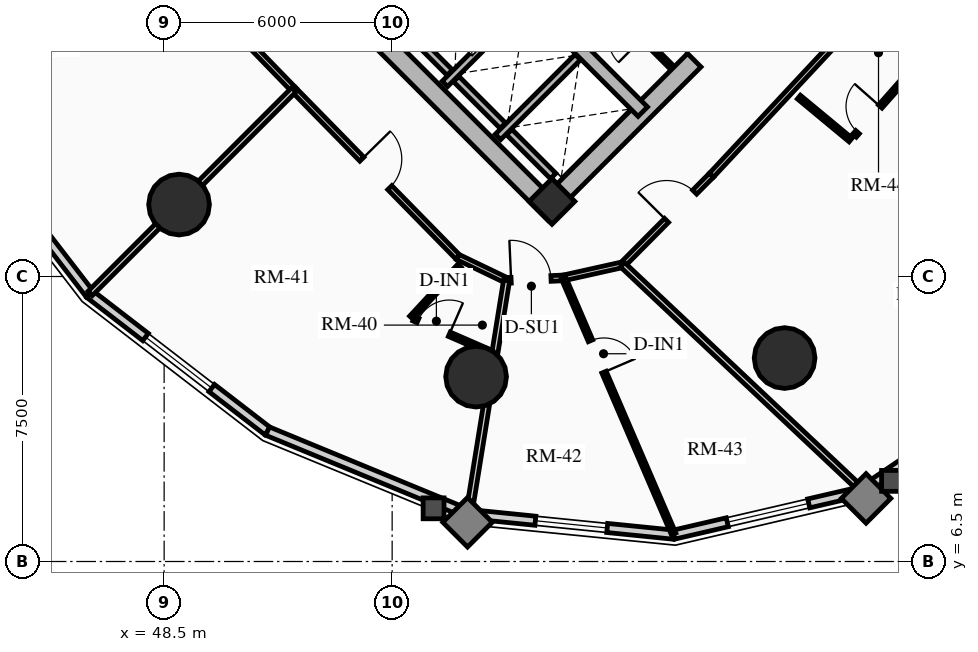
"""IFC4 building model, lengths in metres.
Left out: names, types, materials, properties, quantities, classifications, styles, units other than length and angle.
Written with IfcOpenShell. Run it as: python <this file> out.ifc"""

import sys

from ifc_helpers import new_model, si_unit, direction, frame, frame_2d, origin, origin_2d, place, context, subcontext, project, spatial, rectangle, circle, extrude, source, transform, mapped, element, fill, save


model = new_model("IFC4")
c1 = context("Model", 3, precision=1e-05, world=origin(), true_north=direction((0.0, 1.0)))
c2 = subcontext(c1, "Body", "Model", "MODEL_VIEW")
j1 = project(units=[si_unit("LENGTHUNIT", "METRE"), si_unit("PLANEANGLEUNIT", "RADIAN")], contexts=[c1])
p1 = place(None, origin())
s1 = spatial("IfcSite", under=j1, at=p1, CompositionType="ELEMENT")
p2 = place(p1, origin())
s2 = spatial("IfcBuilding", under=s1, at=p2, CompositionType="ELEMENT")
p3 = place(p2, frame((0.0, 0.0, 30.73)))
s3 = spatial("IfcBuildingStorey", under=s2, at=p3, CompositionType="ELEMENT", Elevation=30.73)
p4 = place(p3, frame((58.773, 15.661, 0.0), z_axis=(0.0, 0.0, 1.0), x_axis=(-0.707106781187, 0.707106781187, 0.0)))
e1 = element("IfcWall", 1, at=p4, inside=s3, PredefinedType="SHEAR", context=c2, shape_type="SweptSolid", body=[
    extrude(rectangle(XDim=14.3, YDim=0.5, at=frame_2d((7.15, 0.0))), origin(), (0.0, 0.0, 1.0), 2.91),
])
p5 = place(p3, frame((58.596, 15.838, 0.0), z_axis=(0.0, 0.0, 1.0), x_axis=(0.707106781187, 0.707106781187, 0.0)))
e2 = element("IfcWall", 2, at=p5, inside=s3, PredefinedType="SHEAR", context=c2, shape_type="SweptSolid", body=[
    extrude(rectangle(XDim=10.7, YDim=0.5, at=frame_2d((5.35, 0.0))), origin(), (0.0, 0.0, 1.0), 2.91),
])
m1 = source(origin(), c2, "Body", "SweptSolid", [
    extrude(rectangle(XDim=1.5, YDim=2.02, at=frame_2d((0.75, 1.01))), frame((0.0, 0.26, 0.0), z_axis=(0.0, -1.0, 0.0), x_axis=(1.0, 0.0, 0.0)), (0.0, 0.0, 1.0), 0.52),
])
p6 = place(p5, frame((5.45, 0.0, 0.0)))
e3 = element("IfcOpeningElement", 3, at=p6, cuts=e2, PredefinedType="OPENING", context=c2, shape_type="MappedRepresentation", body=[
    mapped(m1, transform((0.0, 0.0, 0.0), x_axis=(1.0, 0.0, 0.0), y_axis=(0.0, 1.0, 0.0), z_axis=(0.0, 0.0, 1.0), scale=1.0)),
])
p7 = place(p3, frame((61.096, 18.338, 0.0), z_axis=(0.0, 0.0, 1.0), x_axis=(-0.707106781187, 0.707106781187, 0.0)))
e4 = element("IfcWall", 4, at=p7, inside=s3, PredefinedType="SHEAR", context=c2, shape_type="SweptSolid", body=[
    extrude(rectangle(XDim=13.8, YDim=0.35, at=frame_2d((6.9, 0.0))), origin(), (0.0, 0.0, 1.0), 2.91),
])
m2 = source(origin(), c2, "Body", "SweptSolid", [
    extrude(rectangle(XDim=1.1, YDim=2.015, at=frame_2d((0.55, 1.007))), frame((0.0, 0.185, 0.0), z_axis=(0.0, -1.0, 0.0), x_axis=(1.0, 0.0, 0.0)), (0.0, 0.0, 1.0), 0.37),
])
p8 = place(p7, frame((4.9, 0.0, 0.0)))
e5 = element("IfcOpeningElement", 5, at=p8, cuts=e4, PredefinedType="OPENING", context=c2, shape_type="MappedRepresentation", body=[
    mapped(m2, transform((0.0, 0.0, 0.0), x_axis=(1.0, 0.0, 0.0), y_axis=(0.0, 1.0, 0.0), z_axis=(0.0, 0.0, 1.0), scale=1.0)),
])
m3 = source(origin(), c2, "Body", "SweptSolid", [
    extrude(rectangle(XDim=1.15, YDim=2.02, at=frame_2d((0.575, 1.01))), frame((0.0, 0.185, 0.0), z_axis=(0.0, -1.0, 0.0), x_axis=(1.0, 0.0, 0.0)), (0.0, 0.0, 1.0), 0.37),
])
p9 = place(p7, frame((7.32, 0.0, 0.0)))
e6 = element("IfcOpeningElement", 6, at=p9, cuts=e4, PredefinedType="OPENING", context=c2, shape_type="MappedRepresentation", body=[
    mapped(m3, transform((0.0, 0.0, 0.0), x_axis=(1.0, 0.0, 0.0), y_axis=(0.0, 1.0, 0.0), z_axis=(0.0, 0.0, 1.0), scale=1.0)),
])
p10 = place(p3, frame((58.706, 15.976, 0.0), z_axis=(0.0, 0.0, 1.0), x_axis=(0.707106781187, 0.707106781187, 0.0)))
e7 = element("IfcColumn", 7, at=p10, inside=s3, PredefinedType="COLUMN", context=c2, shape_type="SweptSolid", body=[
    extrude(rectangle(XDim=0.85, YDim=0.85, at=origin_2d()), origin(), (0.0, 0.0, 1.0), 2.91),
])
for number, where, z_axis, x_axis in (
    (8, (48.893, 15.893, 0.0), (0.0, 0.0, 1.0), (1.0, 0.0, 0.0)),
    (9, (56.709, 11.365, 0.0), (0.0, 0.0, 1.0), (1.0, 0.0, 0.0)),
    (10, (64.827, 11.854, 0.0), (0.0, 0.0, 1.0), (1.0, 0.0, 0.0)),
):
    element("IfcColumn", number, at=place(p3, frame(where, z_axis=z_axis, x_axis=x_axis)), inside=s3, PredefinedType="USERDEFINED", context=c2, shape_type="SweptSolid", body=[
        extrude(circle(Radius=0.8, at=origin_2d()), origin(), (0.0, 0.0, 1.0), 2.91),
    ])
p11 = place(p3, frame((46.541, 13.541, 0.0), z_axis=(0.0, 0.0, 1.0), x_axis=(-0.610494906082, 0.792020182601, 0.0)))
e11 = element("IfcWall", 11, at=p11, inside=s3, PredefinedType="SOLIDWALL", context=c2, shape_type="SweptSolid", body=[
    extrude(rectangle(XDim=5.911, YDim=0.24, at=frame_2d((2.956, 0.0))), origin(), (0.0, 0.0, 1.0), 2.073),
])
p12 = place(p3, frame((51.222, 9.932, 0.0), z_axis=(0.0, 0.0, 1.0), x_axis=(-0.792020182601, 0.610494906082, 0.0)))
e12 = element("IfcWall", 12, at=p12, inside=s3, PredefinedType="SOLIDWALL", context=c2, shape_type="SweptSolid", body=[
    extrude(rectangle(XDim=5.911, YDim=0.24, at=frame_2d((2.956, 0.0))), origin(), (0.0, 0.0, 1.0), 2.073),
])
m4 = source(origin(), c2, "Body", "SweptSolid", [
    extrude(rectangle(XDim=2.2, YDim=1.35, at=frame_2d((1.1, 0.675))), frame((0.0, 0.13, 0.0), z_axis=(0.0, -1.0, 0.0), x_axis=(1.0, 0.0, 0.0)), (0.0, 0.0, 1.0), 0.26),
])
p13 = place(p12, frame((1.855, 0.0, 0.65)))
e13 = element("IfcOpeningElement", 13, at=p13, cuts=e12, PredefinedType="OPENING", context=c2, shape_type="MappedRepresentation", body=[
    mapped(m4, transform((0.0, 0.0, 0.0), x_axis=(1.0, 0.0, 0.0), y_axis=(0.0, 1.0, 0.0), z_axis=(0.0, 0.0, 1.0), scale=1.0)),
])
p14 = place(p3, frame((56.518, 7.749, 0.0), z_axis=(0.0, 0.0, 1.0), x_axis=(-0.924542988536, 0.381077764176, 0.0)))
e14 = element("IfcWall", 14, at=p14, inside=s3, PredefinedType="SOLIDWALL", context=c2, shape_type="SweptSolid", body=[
    extrude(rectangle(XDim=5.728, YDim=0.24, at=frame_2d((2.864, 0.0))), origin(), (0.0, 0.0, 1.0), 2.073),
])
p15 = place(p3, frame((61.91, 7.206, 0.0), z_axis=(0.0, 0.0, 1.0), x_axis=(-0.994968263437, 0.100190592135, 0.0)))
e15 = element("IfcWall", 15, at=p15, inside=s3, PredefinedType="SOLIDWALL", context=c2, shape_type="SweptSolid", body=[
    extrude(rectangle(XDim=5.419, YDim=0.24, at=frame_2d((2.71, 0.0))), origin(), (0.0, 0.0, 1.0), 2.073),
])
m5 = source(origin(), c2, "Body", "SweptSolid", [
    extrude(rectangle(XDim=1.9, YDim=1.35, at=frame_2d((0.95, 0.675))), frame((0.0, 0.13, 0.0), z_axis=(0.0, -1.0, 0.0), x_axis=(1.0, 0.0, 0.0)), (0.0, 0.0, 1.0), 0.26),
])
p16 = place(p15, frame((1.76, 0.0, 0.65)))
e16 = element("IfcOpeningElement", 16, at=p16, cuts=e15, PredefinedType="OPENING", context=c2, shape_type="MappedRepresentation", body=[
    mapped(m5, transform((0.0, 0.0, 0.0), x_axis=(1.0, 0.0, 0.0), y_axis=(0.0, 1.0, 0.0), z_axis=(0.0, 0.0, 1.0), scale=1.0)),
])
p17 = place(p3, frame((66.871, 8.356, 0.0), z_axis=(0.0, 0.0, 1.0), x_axis=(-0.974167686491, -0.22582585901, 0.0)))
e17 = element("IfcWall", 17, at=p17, inside=s3, PredefinedType="SOLIDWALL", context=c2, shape_type="SweptSolid", body=[
    extrude(rectangle(XDim=5.092, YDim=0.24, at=frame_2d((2.546, 0.0))), origin(), (0.0, 0.0, 1.0), 2.073),
])
p18 = place(p17, frame((1.446, 0.0, 0.65)))
e18 = element("IfcOpeningElement", 18, at=p18, cuts=e17, PredefinedType="OPENING", context=c2, shape_type="MappedRepresentation", body=[
    mapped(m4, transform((0.0, 0.0, 0.0), x_axis=(1.0, 0.0, 0.0), y_axis=(0.0, 1.0, 0.0), z_axis=(0.0, 0.0, 1.0), scale=1.0)),
])
p19 = place(p3, frame((70.914, 11.086, 0.0), z_axis=(0.0, 0.0, 1.0), x_axis=(-0.828748297084, -0.559621532896, 0.0)))
e19 = element("IfcWall", 19, at=p19, inside=s3, PredefinedType="SOLIDWALL", context=c2, shape_type="SweptSolid", body=[
    extrude(rectangle(XDim=4.879, YDim=0.24, at=frame_2d((2.439, 0.0))), origin(), (0.0, 0.0, 1.0), 2.073),
])
p20 = place(p3, frame((55.888, 19.069, 0.0), z_axis=(0.0, 0.0, 1.0), x_axis=(0.707106781187, 0.707106781187, 0.0)))
e20 = element("IfcWall", 20, at=p20, inside=s3, PredefinedType="SHEAR", context=c2, shape_type="SweptSolid", body=[
    extrude(rectangle(XDim=2.97, YDim=0.2, at=frame_2d((1.485, 0.0))), origin(), (0.0, 0.0, 1.0), 2.91),
])
p21 = place(p3, frame((56.015, 19.366, 0.0), z_axis=(0.0, 0.0, 1.0), x_axis=(-0.707106781187, 0.707106781187, 0.0)))
e21 = element("IfcWall", 21, at=p21, inside=s3, PredefinedType="SHEAR", context=c2, shape_type="SweptSolid", body=[
    extrude(rectangle(XDim=2.44, YDim=0.2, at=frame_2d((1.22, 0.0))), origin(), (0.0, 0.0, 1.0), 2.91),
])
p22 = place(p3, frame((57.284, 17.673, 0.0), z_axis=(0.0, 0.0, 1.0), x_axis=(0.707147878904, 0.70706568108, 0.0)))
e22 = element("IfcWall", 22, at=p22, inside=s3, PredefinedType="SHEAR", context=c2, shape_type="SweptSolid", body=[
    extrude(rectangle(XDim=2.97, YDim=0.2, at=frame_2d((1.485, 0.0))), origin(), (0.0, 0.0, 1.0), 2.91),
])
p23 = place(p3, frame((57.412, 17.97, 0.0), z_axis=(0.0, 0.0, 1.0), x_axis=(-0.707106781187, 0.707106781187, 0.0)))
e23 = element("IfcWall", 23, at=p23, inside=s3, PredefinedType="SHEAR", context=c2, shape_type="SweptSolid", body=[
    extrude(rectangle(XDim=1.735, YDim=0.2, at=frame_2d((0.867, 0.0))), origin(), (0.0, 0.0, 1.0), 2.91),
])
p24 = place(p3, frame((58.737, 16.644, 0.0), z_axis=(0.0, 0.0, 1.0), x_axis=(-0.707032117043, 0.707181437447, 0.0)))
e24 = element("IfcWall", 24, at=p24, inside=s3, PredefinedType="SHEAR", context=c2, shape_type="SweptSolid", body=[
    extrude(rectangle(XDim=1.635, YDim=0.2, at=frame_2d((0.817, 0.0))), origin(), (0.0, 0.0, 1.0), 2.91),
])
p25 = place(p3, frame((61.835, 19.529, 0.0), z_axis=(0.0, 0.0, 1.0), x_axis=(-0.707146413884, 0.707067146267, 0.0)))
e25 = element("IfcWall", 25, at=p25, inside=s3, PredefinedType="PARTITIONING", context=c2, shape_type="SweptSolid", body=[
    extrude(rectangle(XDim=3.08, YDim=0.125, at=frame_2d((1.54, 0.0))), origin(), (0.0, 0.0, 1.0), 2.635),
])
m6 = source(origin(), c2, "Body", "SweptSolid", [
    extrude(rectangle(XDim=0.9, YDim=2.005, at=frame_2d((0.45, 1.002))), frame((0.0, 0.073, 0.0), z_axis=(0.0, -1.0, 0.0), x_axis=(1.0, 0.0, 0.0)), (0.0, 0.0, 1.0), 0.145),
])
p26 = place(p25, frame((1.05, 0.0, 0.0)))
e26 = element("IfcOpeningElement", 26, at=p26, cuts=e25, PredefinedType="OPENING", context=c2, shape_type="MappedRepresentation", body=[
    mapped(m6, transform((0.0, 0.0, 0.0), x_axis=(1.0, 0.0, 0.0), y_axis=(0.0, 1.0, 0.0), z_axis=(0.0, 0.0, 1.0), scale=1.0)),
])
p27 = place(p3, frame((47.706, 23.253, 0.0), z_axis=(0.0, 0.0, 1.0), x_axis=(0.696179266346, -0.717867974707, 0.0)))
e27 = element("IfcWall", 27, at=p27, inside=s3, PredefinedType="PARTITIONING", context=c2, shape_type="SweptSolid", body=[
    extrude(rectangle(XDim=6.045, YDim=0.15, at=frame_2d((3.022, 0.0))), origin(), (0.0, 0.0, 1.0), 2.635),
])
m7 = source(origin(), c2, "Body", "SweptSolid", [
    extrude(rectangle(XDim=1.05, YDim=2.015, at=frame_2d((0.525, 1.007))), frame((0.0, 0.085, 0.0), z_axis=(0.0, -1.0, 0.0), x_axis=(1.0, 0.0, 0.0)), (0.0, 0.0, 1.0), 0.17),
])
p28 = place(p27, frame((2.497, 0.0, 0.0)))
e28 = element("IfcOpeningElement", 28, at=p28, cuts=e27, PredefinedType="OPENING", context=c2, shape_type="MappedRepresentation", body=[
    mapped(m7, transform((0.0, 0.0, 0.0), x_axis=(1.0, 0.0, 0.0), y_axis=(0.0, 1.0, 0.0), z_axis=(0.0, 0.0, 1.0), scale=1.0)),
])
p29 = place(p3, frame((51.914, 18.914, 0.0), z_axis=(0.0, 0.0, 1.0), x_axis=(0.699999313799, -0.714143515465, 0.0)))
e29 = element("IfcWall", 29, at=p29, inside=s3, PredefinedType="PARTITIONING", context=c2, shape_type="SweptSolid", body=[
    extrude(rectangle(XDim=6.162, YDim=0.15, at=frame_2d((3.081, 0.0))), origin(), (0.0, 0.0, 1.0), 2.159),
])
p30 = place(p29, frame((2.556, 0.0, 0.0)))
e30 = element("IfcOpeningElement", 30, at=p30, cuts=e29, PredefinedType="OPENING", context=c2, shape_type="MappedRepresentation", body=[
    mapped(m7, transform((0.0, 0.0, 0.0), x_axis=(1.0, 0.0, 0.0), y_axis=(0.0, 1.0, 0.0), z_axis=(0.0, 0.0, 1.0), scale=1.0)),
])
p31 = place(p3, frame((56.227, 14.513, 0.0), z_axis=(0.0, 0.0, 1.0), x_axis=(0.901477579283, -0.432825801044, 0.0)))
e31 = element("IfcWall", 31, at=p31, inside=s3, PredefinedType="PARTITIONING", context=c2, shape_type="SweptSolid", body=[
    extrude(rectangle(XDim=1.424, YDim=0.15, at=frame_2d((0.712, 0.0))), origin(), (0.0, 0.0, 1.0), 2.205),
])
p32 = place(p3, frame((57.511, 13.897, 0.0), z_axis=(0.0, 0.0, 1.0), x_axis=(0.999024538494, 0.044158481476, 0.0)))
e32 = element("IfcWall", 32, at=p32, inside=s3, PredefinedType="PARTITIONING", context=c2, shape_type="SweptSolid", body=[
    extrude(rectangle(XDim=1.498, YDim=0.15, at=frame_2d((0.749, 0.0))), origin(), (0.0, 0.0, 1.0), 2.159),
])
p33 = place(p32, frame((0.12, 0.0, 0.0)))
e33 = element("IfcOpeningElement", 33, at=p33, cuts=e32, PredefinedType="OPENING", context=c2, shape_type="MappedRepresentation", body=[
    mapped(m7, transform((0.0, 0.0, 0.0), x_axis=(1.0, 0.0, 0.0), y_axis=(0.0, 1.0, 0.0), z_axis=(0.0, 0.0, 1.0), scale=1.0)),
])
p34 = place(p3, frame((59.008, 13.963, 0.0), z_axis=(0.0, 0.0, 1.0), x_axis=(0.976020856791, 0.21767702476, 0.0)))
e34 = element("IfcWall", 34, at=p34, inside=s3, PredefinedType="PARTITIONING", context=c2, shape_type="SweptSolid", body=[
    extrude(rectangle(XDim=1.593, YDim=0.15, at=frame_2d((0.796, 0.0))), origin(), (0.0, 0.0, 1.0), 2.205),
])
p35 = place(p3, frame((60.562, 14.31, 0.0), z_axis=(0.0, 0.0, 1.0), x_axis=(0.704566236161, 0.709638230975, 0.0)))
e35 = element("IfcWall", 35, at=p35, inside=s3, PredefinedType="PARTITIONING", context=c2, shape_type="SweptSolid", body=[
    extrude(rectangle(XDim=3.321, YDim=0.15, at=frame_2d((1.661, 0.0))), origin(), (0.0, 0.0, 1.0), 2.159),
])
p36 = place(p35, frame((1.643, 0.0, 0.0)))
e36 = element("IfcOpeningElement", 36, at=p36, cuts=e35, PredefinedType="OPENING", context=c2, shape_type="MappedRepresentation", body=[
    mapped(m7, transform((0.0, 0.0, 0.0), x_axis=(1.0, 0.0, 0.0), y_axis=(0.0, 1.0, 0.0), z_axis=(0.0, 0.0, 1.0), scale=1.0)),
])
p37 = place(p3, frame((62.903, 16.667, 0.0), z_axis=(0.0, 0.0, 1.0), x_axis=(0.682371947497, 0.731005147225, 0.0)))
e37 = element("IfcWall", 37, at=p37, inside=s3, PredefinedType="PARTITIONING", context=c2, shape_type="SweptSolid", body=[
    extrude(rectangle(XDim=6.642, YDim=0.15, at=frame_2d((3.321, 0.0))), origin(), (0.0, 0.0, 1.0), 2.159),
])
p38 = place(p3, frame((51.914, 18.914, 0.0), z_axis=(0.0, 0.0, 1.0), x_axis=(-0.707106781187, -0.707106781187, 0.0)))
e38 = element("IfcWall", 38, at=p38, inside=s3, PredefinedType="PARTITIONING", context=c2, shape_type="SweptSolid", body=[
    extrude(rectangle(XDim=7.579, YDim=0.16, at=frame_2d((3.79, 0.0))), origin(), (0.0, 0.0, 1.0), 2.073),
])
p39 = place(p3, frame((57.511, 13.897, 0.0), z_axis=(0.0, 0.0, 1.0), x_axis=(-0.159485929017, -0.987200201806, 0.0)))
e39 = element("IfcWall", 39, at=p39, inside=s3, PredefinedType="PARTITIONING", context=c2, shape_type="SweptSolid", body=[
    extrude(rectangle(XDim=6.207, YDim=0.16, at=frame_2d((3.104, 0.0))), origin(), (0.0, 0.0, 1.0), 2.073),
])
p40 = place(p3, frame((60.562, 14.31, 0.0), z_axis=(0.0, 0.0, 1.0), x_axis=(0.727781661561, -0.685808904211, 0.0)))
e40 = element("IfcWall", 40, at=p40, inside=s3, PredefinedType="PARTITIONING", context=c2, shape_type="SweptSolid", body=[
    extrude(rectangle(XDim=8.655, YDim=0.16, at=frame_2d((4.328, 0.0))), origin(), (0.0, 0.0, 1.0), 2.073),
])
p41 = place(p3, frame((67.435, 21.521, 0.0), z_axis=(0.0, 0.0, 1.0), x_axis=(0.6962628802, -0.717786877601, 0.0)))
e41 = element("IfcWall", 41, at=p41, inside=s3, PredefinedType="PARTITIONING", context=c2, shape_type="SweptSolid", body=[
    extrude(rectangle(XDim=8.893, YDim=0.16, at=frame_2d((4.446, 0.0))), origin(), (0.0, 0.0, 1.0), 2.073),
])
p42 = place(p3, frame((56.274, 14.283, 0.0), z_axis=(0.0, 0.0, 1.0), x_axis=(-0.679968993343, -0.733240866354, 0.0)))
e42 = element("IfcWall", 42, at=p42, inside=s3, PredefinedType="PARTITIONING", context=c2, shape_type="SweptSolid", body=[
    extrude(rectangle(XDim=1.865, YDim=0.125, at=frame_2d((0.933, 0.0))), origin(), (0.0, 0.0, 1.0), 2.205),
])
p43 = place(p3, frame((55.069, 12.888, 0.0), z_axis=(0.0, 0.0, 1.0), x_axis=(0.916790743628, -0.399367916085, 0.0)))
e43 = element("IfcWall", 43, at=p43, inside=s3, PredefinedType="PARTITIONING", context=c2, shape_type="SweptSolid", body=[
    extrude(rectangle(XDim=2.225, YDim=0.125, at=frame_2d((1.113, 0.0))), origin(), (0.0, 0.0, 1.0), 2.159),
])
p44 = place(p43, frame((0.12, 0.0, 0.0)))
e44 = element("IfcOpeningElement", 44, at=p44, cuts=e43, PredefinedType="OPENING", context=c2, shape_type="MappedRepresentation", body=[
    mapped(m6, transform((0.0, 0.0, 0.0), x_axis=(1.0, 0.0, 0.0), y_axis=(0.0, 1.0, 0.0), z_axis=(0.0, 0.0, 1.0), scale=1.0)),
])
p45 = place(p3, frame((59.008, 13.963, 0.0), z_axis=(0.0, 0.0, 1.0), x_axis=(0.395256697593, -0.918570706592, 0.0)))
e45 = element("IfcWall", 45, at=p45, inside=s3, PredefinedType="PARTITIONING", context=c2, shape_type="SweptSolid", body=[
    extrude(rectangle(XDim=7.334, YDim=0.125, at=frame_2d((3.667, 0.0))), origin(), (0.0, 0.0, 1.0), 2.073),
])
p46 = place(p45, frame((1.8, 0.0, 0.0)))
e46 = element("IfcOpeningElement", 46, at=p46, cuts=e45, PredefinedType="OPENING", context=c2, shape_type="MappedRepresentation", body=[
    mapped(m6, transform((0.0, 0.0, 0.0), x_axis=(1.0, 0.0, 0.0), y_axis=(0.0, 1.0, 0.0), z_axis=(0.0, 0.0, 1.0), scale=1.0)),
])
p47 = place(p3, frame((65.202, 18.721, 0.0), z_axis=(0.0, 0.0, 1.0), x_axis=(0.769814202386, -0.638268042287, 0.0)))
e47 = element("IfcWall", 47, at=p47, inside=s3, PredefinedType="PARTITIONING", context=c2, shape_type="SweptSolid", body=[
    extrude(rectangle(XDim=1.769, YDim=0.125, at=frame_2d((0.884, 0.0))), origin(), (0.0, 0.0, 1.0), 2.635),
])
p48 = place(p3, frame((66.667, 17.709, 0.0), z_axis=(0.0, 0.0, 1.0), x_axis=(0.662510581678, 0.749052554341, 0.0)))
e48 = element("IfcWall", 48, at=p48, inside=s3, PredefinedType="PARTITIONING", context=c2, shape_type="SweptSolid", body=[
    extrude(rectangle(XDim=2.996, YDim=0.125, at=frame_2d((1.498, 0.0))), origin(), (0.0, 0.0, 1.0), 2.159),
])
p49 = place(p48, frame((0.12, 0.0, 0.0)))
e49 = element("IfcOpeningElement", 49, at=p49, cuts=e48, PredefinedType="OPENING", context=c2, shape_type="MappedRepresentation", body=[
    mapped(m6, transform((0.0, 0.0, 0.0), x_axis=(1.0, 0.0, 0.0), y_axis=(0.0, 1.0, 0.0), z_axis=(0.0, 0.0, 1.0), scale=1.0)),
])
m8 = source(origin(), c2, "Body", "SweptSolid", [
    extrude(rectangle(XDim=2.2, YDim=1.35, at=frame_2d((1.1, 0.675))), frame((0.0, 0.03, 0.0), z_axis=(0.0, -1.0, 0.0), x_axis=(1.0, 0.0, 0.0)), (0.0, 0.0, 1.0), 0.06),
])
p50 = place(p13, origin())
e50 = element("IfcWindow", 50, at=p50, inside=s3, PartitioningType="DOUBLE_PANEL_VERTICAL", PredefinedType="WINDOW", context=c2, shape_type="MappedRepresentation", body=[
    mapped(m8, transform((0.0, 0.0, 0.0), x_axis=(1.0, 0.0, 0.0), y_axis=(0.0, 1.0, 0.0), z_axis=(0.0, 0.0, 1.0), scale=1.0)),
])
fill(e13, e50)
m9 = source(origin(), c2, "Body", "SweptSolid", [
    extrude(rectangle(XDim=1.9, YDim=1.35, at=frame_2d((0.95, 0.675))), frame((0.0, 0.03, 0.0), z_axis=(0.0, -1.0, 0.0), x_axis=(1.0, 0.0, 0.0)), (0.0, 0.0, 1.0), 0.06),
])
p51 = place(p16, origin())
e51 = element("IfcWindow", 51, at=p51, inside=s3, PartitioningType="DOUBLE_PANEL_VERTICAL", PredefinedType="WINDOW", context=c2, shape_type="MappedRepresentation", body=[
    mapped(m9, transform((0.0, 0.0, 0.0), x_axis=(1.0, 0.0, 0.0), y_axis=(0.0, 1.0, 0.0), z_axis=(0.0, 0.0, 1.0), scale=1.0)),
])
fill(e16, e51)
p52 = place(p18, origin())
e52 = element("IfcWindow", 52, at=p52, inside=s3, PartitioningType="DOUBLE_PANEL_VERTICAL", PredefinedType="WINDOW", context=c2, shape_type="MappedRepresentation", body=[
    mapped(m8, transform((0.0, 0.0, 0.0), x_axis=(1.0, 0.0, 0.0), y_axis=(0.0, 1.0, 0.0), z_axis=(0.0, 0.0, 1.0), scale=1.0)),
])
fill(e18, e52)
m10 = source(origin(), c2, "Body", "SweptSolid", [
    extrude(rectangle(XDim=1.5, YDim=2.02, at=frame_2d((0.75, 1.01))), frame((0.0, 0.025, 0.0), z_axis=(0.0, -1.0, 0.0), x_axis=(1.0, 0.0, 0.0)), (0.0, 0.0, 1.0), 0.05),
])
p53 = place(p6, origin())
e53 = element("IfcDoor", 53, at=p53, inside=s3, OperationType="DOUBLE_DOOR_SINGLE_SWING", PredefinedType="DOOR", context=c2, shape_type="MappedRepresentation", body=[
    mapped(m10, transform((0.0, 0.0, 0.0), x_axis=(1.0, 0.0, 0.0), y_axis=(0.0, 1.0, 0.0), z_axis=(0.0, 0.0, 1.0), scale=1.0)),
])
fill(e3, e53)
m11 = source(origin(), c2, "Body", "SweptSolid", [
    extrude(rectangle(XDim=1.05, YDim=2.015, at=frame_2d((0.525, 1.007))), frame((0.0, 0.025, 0.0), z_axis=(0.0, -1.0, 0.0), x_axis=(1.0, 0.0, 0.0)), (0.0, 0.0, 1.0), 0.05),
])
p54 = place(p30, origin())
e54 = element("IfcDoor", 54, at=p54, inside=s3, OperationType="SINGLE_SWING_LEFT", PredefinedType="DOOR", context=c2, shape_type="MappedRepresentation", body=[
    mapped(m11, transform((0.0, 0.0, 0.0), x_axis=(1.0, 0.0, 0.0), y_axis=(0.0, 1.0, 0.0), z_axis=(0.0, 0.0, 1.0), scale=1.0)),
])
fill(e30, e54)
m12 = source(origin(), c2, "Body", "SweptSolid", [
    extrude(rectangle(XDim=0.9, YDim=2.005, at=frame_2d((0.45, 1.002))), frame((0.0, 0.025, 0.0), z_axis=(0.0, -1.0, 0.0), x_axis=(1.0, 0.0, 0.0)), (0.0, 0.0, 1.0), 0.05),
])
p55 = place(p44, origin())
e55 = element("IfcDoor", 55, at=p55, inside=s3, OperationType="SINGLE_SWING_RIGHT", PredefinedType="DOOR", context=c2, shape_type="MappedRepresentation", body=[
    mapped(m12, transform((0.0, 0.0, 0.0), x_axis=(1.0, 0.0, 0.0), y_axis=(0.0, 1.0, 0.0), z_axis=(0.0, 0.0, 1.0), scale=1.0)),
])
fill(e44, e55)
p56 = place(p33, origin())
e56 = element("IfcDoor", 56, at=p56, inside=s3, OperationType="SINGLE_SWING_LEFT", PredefinedType="DOOR", context=c2, shape_type="MappedRepresentation", body=[
    mapped(m11, transform((0.0, 0.0, 0.0), x_axis=(1.0, 0.0, 0.0), y_axis=(0.0, 1.0, 0.0), z_axis=(0.0, 0.0, 1.0), scale=1.0)),
])
fill(e33, e56)
p57 = place(p46, origin())
e57 = element("IfcDoor", 57, at=p57, inside=s3, OperationType="SINGLE_SWING_RIGHT", PredefinedType="DOOR", context=c2, shape_type="MappedRepresentation", body=[
    mapped(m12, transform((0.0, 0.0, 0.0), x_axis=(1.0, 0.0, 0.0), y_axis=(0.0, 1.0, 0.0), z_axis=(0.0, 0.0, 1.0), scale=1.0)),
])
fill(e46, e57)
p58 = place(p36, origin())
e58 = element("IfcDoor", 58, at=p58, inside=s3, OperationType="SINGLE_SWING_LEFT", PredefinedType="DOOR", context=c2, shape_type="MappedRepresentation", body=[
    mapped(m11, transform((0.0, 0.0, 0.0), x_axis=(1.0, 0.0, 0.0), y_axis=(0.0, 1.0, 0.0), z_axis=(0.0, 0.0, 1.0), scale=1.0)),
])
fill(e36, e58)
p59 = place(p49, origin())
e59 = element("IfcDoor", 59, at=p59, inside=s3, OperationType="SINGLE_SWING_RIGHT", PredefinedType="DOOR", context=c2, shape_type="MappedRepresentation", body=[
    mapped(m12, transform((0.0, 0.0, 0.0), x_axis=(1.0, 0.0, 0.0), y_axis=(0.0, 1.0, 0.0), z_axis=(0.0, 0.0, 1.0), scale=1.0)),
])
fill(e49, e59)
save(model, sys.argv[1])
